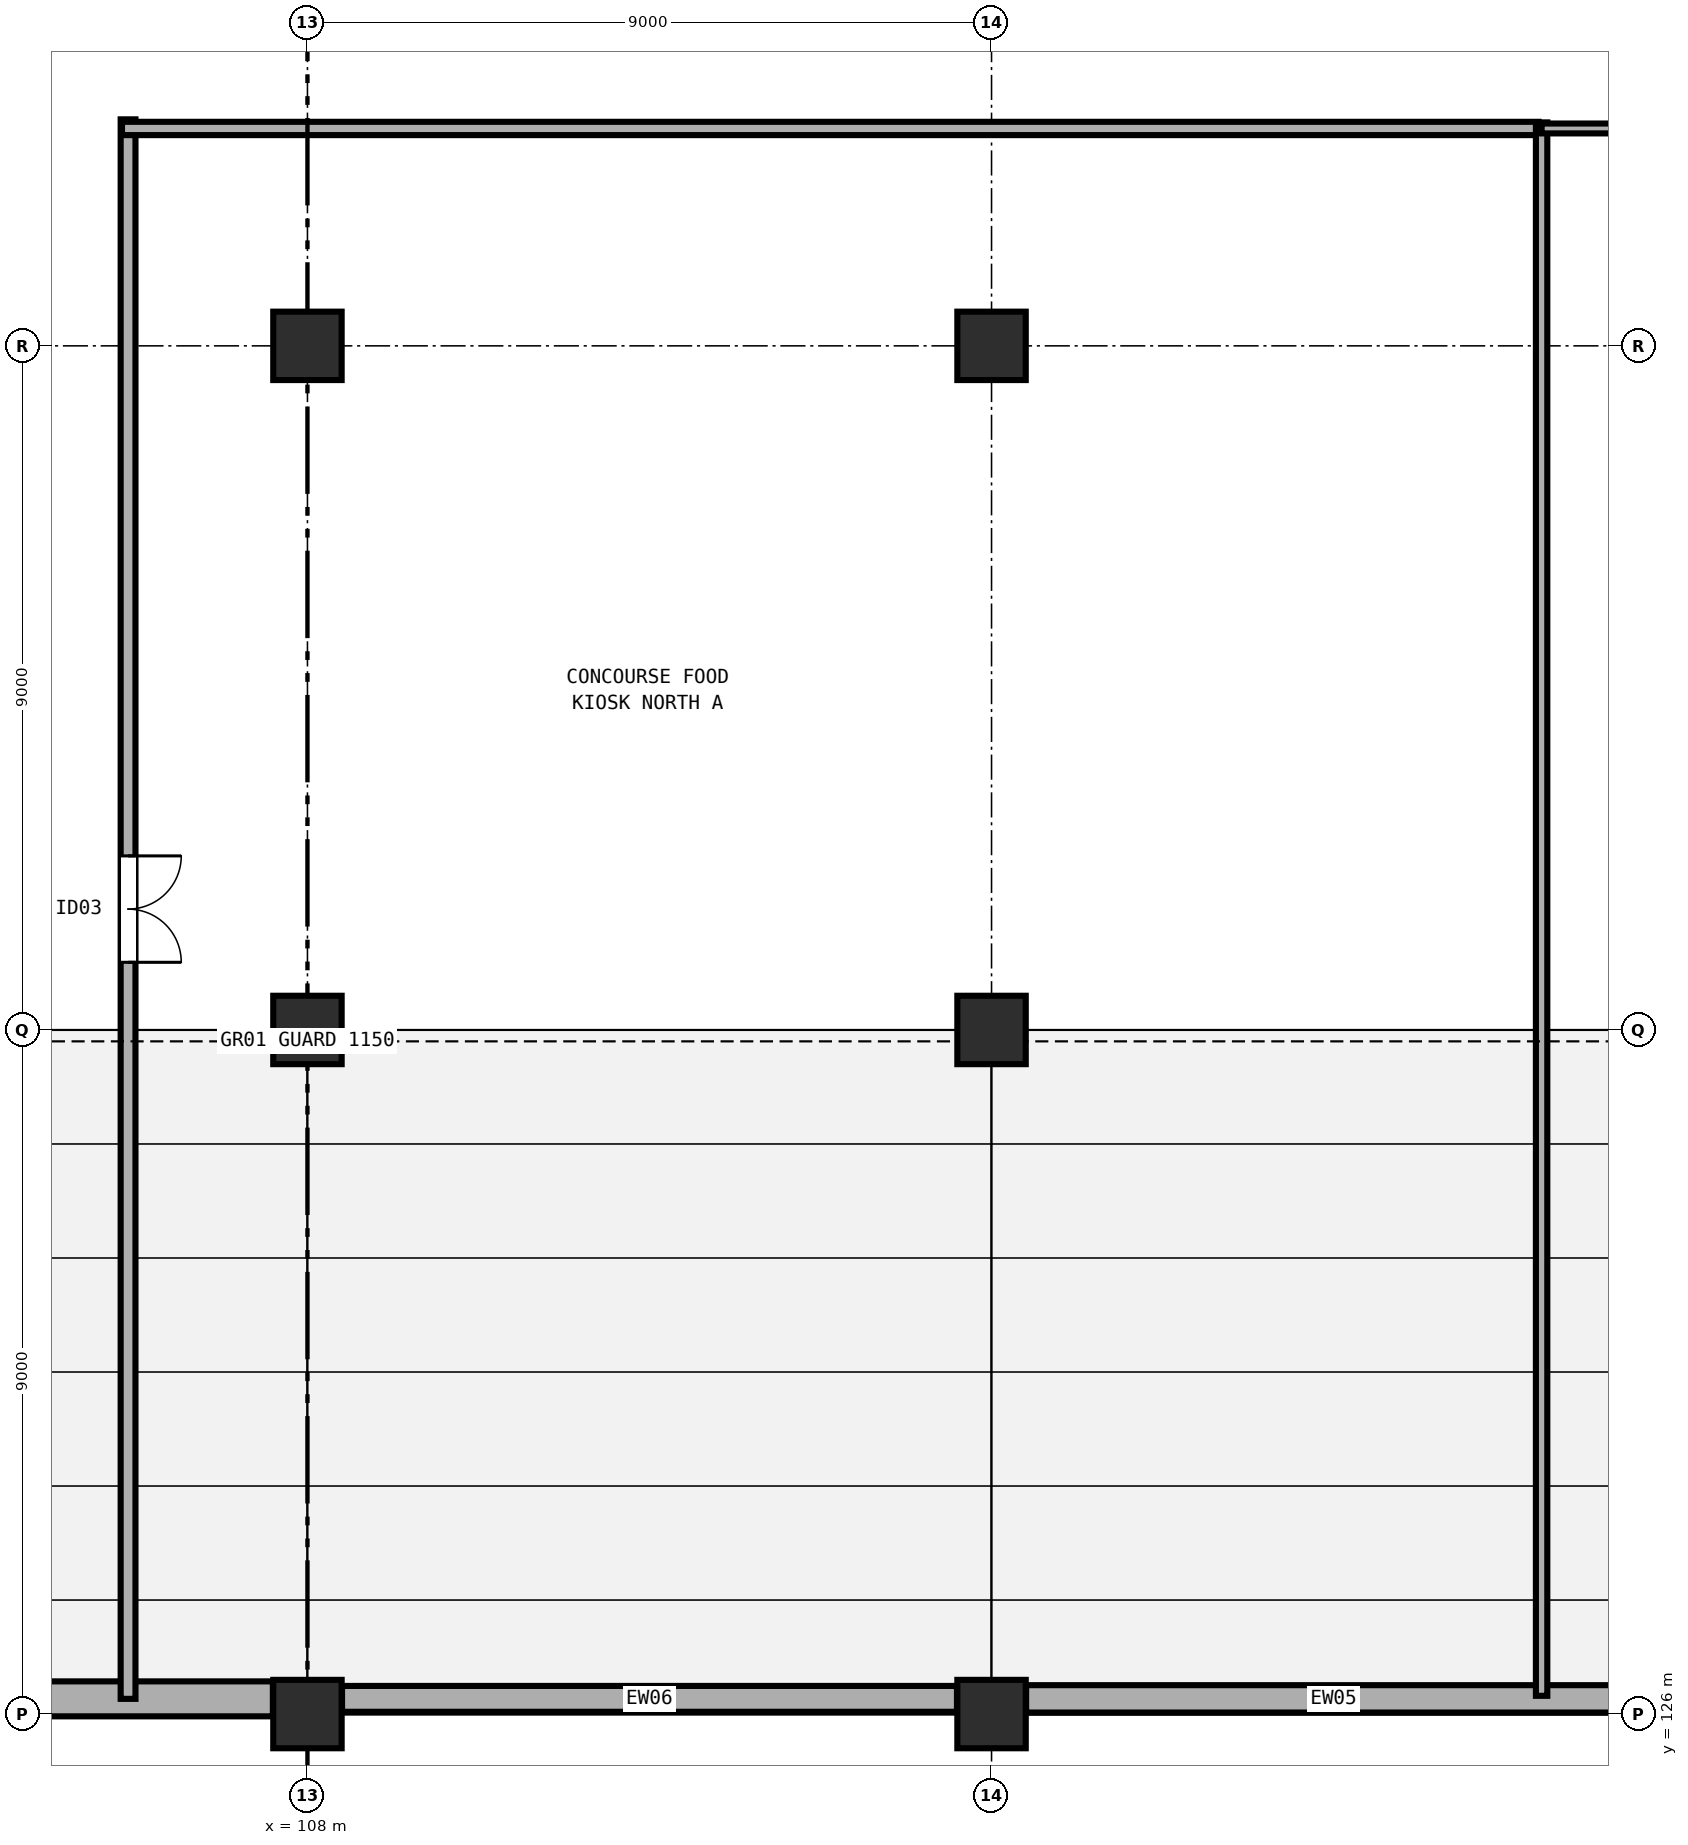
"""IFC4 building model, lengths in metres.
Left out: names, types, materials, properties, quantities, classifications, styles, units other than length and angle.
Written with IfcOpenShell. Run it as: python <this file> out.ifc"""

import sys

from ifc_helpers import new_model, si_unit, direction, frame, frame_2d, origin, origin_2d, place, context, subcontext, project, spatial, rectangle, extrude, element, fill, save


model = new_model("IFC4")
c1 = context("Model", 3, precision=1e-05, world=origin(), true_north=direction((0.0, 1.0)))
c2 = subcontext(c1, "Body", "Model", "MODEL_VIEW")
j1 = project(units=[si_unit("LENGTHUNIT", "METRE"), si_unit("PLANEANGLEUNIT", "RADIAN")], contexts=[c1])
p1 = place(None, origin())
s1 = spatial("IfcSite", under=j1, at=p1, CompositionType="ELEMENT")
p2 = place(p1, origin())
s2 = spatial("IfcBuilding", under=s1, at=p2, CompositionType="ELEMENT")
p3 = place(p2, frame((0.0, 0.0, 4.8)))
s3 = spatial("IfcBuildingStorey", under=s2, at=p3, CompositionType="ELEMENT", Elevation=4.8)
for number, where, z_axis, x_axis in (
    (1, (108.0, 126.0, 0.0), (0.0, 0.0, 1.0), (1.0, 0.0, 0.0)),
    (2, (108.0, 135.0, 0.0), (0.0, 0.0, 1.0), (1.0, 0.0, 0.0)),
    (3, (108.0, 144.0, 0.0), (0.0, 0.0, 1.0), (1.0, 0.0, 0.0)),
    (4, (117.0, 126.0, 0.0), (0.0, 0.0, 1.0), (1.0, 0.0, 0.0)),
    (5, (117.0, 135.0, 0.0), (0.0, 0.0, 1.0), (1.0, 0.0, 0.0)),
    (6, (117.0, 144.0, 0.0), (0.0, 0.0, 1.0), (1.0, 0.0, 0.0)),
):
    element("IfcColumn", number, at=place(p3, frame(where, z_axis=z_axis, x_axis=x_axis)), inside=s3, PredefinedType="COLUMN", context=c2, shape_type="SweptSolid", body=[
        extrude(rectangle(XDim=0.9, YDim=0.9, at=origin_2d()), origin(), (0.0, 0.0, 1.0), 4.8),
    ])
p4 = place(p3, frame((125.545, 126.2, 0.0), z_axis=(0.0, 0.0, 1.0), x_axis=(-1.0, 0.0, 0.0)))
e7 = element("IfcWall", 7, at=p4, inside=s3, PredefinedType="SOLIDWALL", context=c2, shape_type="SweptSolid", body=[
    extrude(rectangle(XDim=8.09, YDim=0.36, at=frame_2d((4.045, 0.0))), origin(), (0.0, 0.0, 1.0), 3.28),
])
p5 = place(p3, frame((116.545, 126.2, 0.0), z_axis=(0.0, 0.0, 1.0), x_axis=(-1.0, 0.0, 0.0)))
e8 = element("IfcWall", 8, at=p5, inside=s3, PredefinedType="SOLIDWALL", context=c2, shape_type="SweptSolid", body=[
    extrude(rectangle(XDim=8.09, YDim=0.34, at=frame_2d((4.045, 0.0))), origin(), (0.0, 0.0, 1.0), 3.28),
])
p6 = place(p3, frame((107.545, 126.2, 0.0), z_axis=(0.0, 0.0, 1.0), x_axis=(-1.0, 0.0, 0.0)))
e9 = element("IfcWall", 9, at=p6, inside=s3, PredefinedType="SOLIDWALL", context=c2, shape_type="SweptSolid", body=[
    extrude(rectangle(XDim=8.09, YDim=0.46, at=frame_2d((4.045, 0.0))), origin(), (0.0, 0.0, 1.0), 3.28),
])
p7 = place(p3, frame((105.64, 146.98, 0.0), z_axis=(0.0, 0.0, 1.0), x_axis=(0.0, -1.0, 0.0)))
e10 = element("IfcWall", 10, at=p7, inside=s3, PredefinedType="PARTITIONING", context=c2, shape_type="SweptSolid", body=[
    extrude(rectangle(XDim=20.78, YDim=0.195, at=frame_2d((10.39, 0.0))), origin(), (0.0, 0.0, 1.0), 3.28),
])
p8 = place(p7, frame((9.69, 0.0, 0.0)))
e11 = element("IfcOpeningElement", 11, at=p8, cuts=e10, PredefinedType="OPENING", context=c2, shape_type="SweptSolid", body=[
    extrude(rectangle(XDim=1.4, YDim=2.15, at=frame_2d((0.7, 1.075))), frame((0.0, 0.107, 0.0), z_axis=(0.0, -1.0, 0.0), x_axis=(1.0, 0.0, 0.0)), (0.0, 0.0, 1.0), 0.215),
])
p9 = place(p3, frame((105.56, 146.86, 0.0), z_axis=(0.0, 0.0, 1.0), x_axis=(1.0, 0.0, 0.0)))
e12 = element("IfcWall", 12, at=p9, inside=s3, PredefinedType="PARTITIONING", context=c2, shape_type="SweptSolid", body=[
    extrude(rectangle(XDim=18.637, YDim=0.175, at=frame_2d((9.318, 0.0))), origin(), (0.0, 0.0, 1.0), 3.28),
])
p10 = place(p3, frame((124.237, 146.94, 0.0), z_axis=(0.0, 0.0, 1.0), x_axis=(0.0, -1.0, 0.0)))
e13 = element("IfcWall", 13, at=p10, inside=s3, PredefinedType="PARTITIONING", context=c2, shape_type="SweptSolid", body=[
    extrude(rectangle(XDim=20.7, YDim=0.15, at=frame_2d((10.35, 0.0))), origin(), (0.0, 0.0, 1.0), 3.28),
])
p11 = place(p3, frame((142.833, 146.86, 0.0), z_axis=(0.0, 0.0, 1.0), x_axis=(-1.0, 0.0, 0.0)))
e14 = element("IfcWall", 14, at=p11, inside=s3, PredefinedType="PARTITIONING", context=c2, shape_type="SweptSolid", body=[
    extrude(rectangle(XDim=18.596, YDim=0.13, at=frame_2d((9.298, 0.0))), origin(), (0.0, 0.0, 1.0), 3.28),
])
p12 = place(p11, frame((8.448, 0.0, 0.0)))
e15 = element("IfcOpeningElement", 15, at=p12, cuts=e14, PredefinedType="OPENING", context=c2, shape_type="SweptSolid", body=[
    extrude(rectangle(XDim=1.7, YDim=2.2, at=frame_2d((0.85, 1.1))), frame((0.0, 0.075, 0.0), z_axis=(0.0, -1.0, 0.0), x_axis=(1.0, 0.0, 0.0)), (0.0, 0.0, 1.0), 0.15),
])
p13 = place(p8, origin())
e16 = element("IfcDoor", 16, at=p13, inside=s3, OperationType="DOUBLE_DOOR_SINGLE_SWING", PredefinedType="DOOR", context=c2, shape_type="SweptSolid", body=[
    extrude(rectangle(XDim=1.4, YDim=2.15, at=frame_2d((0.7, 1.075))), frame((0.0, 0.025, 0.0), z_axis=(0.0, -1.0, 0.0), x_axis=(1.0, 0.0, 0.0)), (0.0, 0.0, 1.0), 0.05),
])
fill(e11, e16)
save(model, sys.argv[1])
